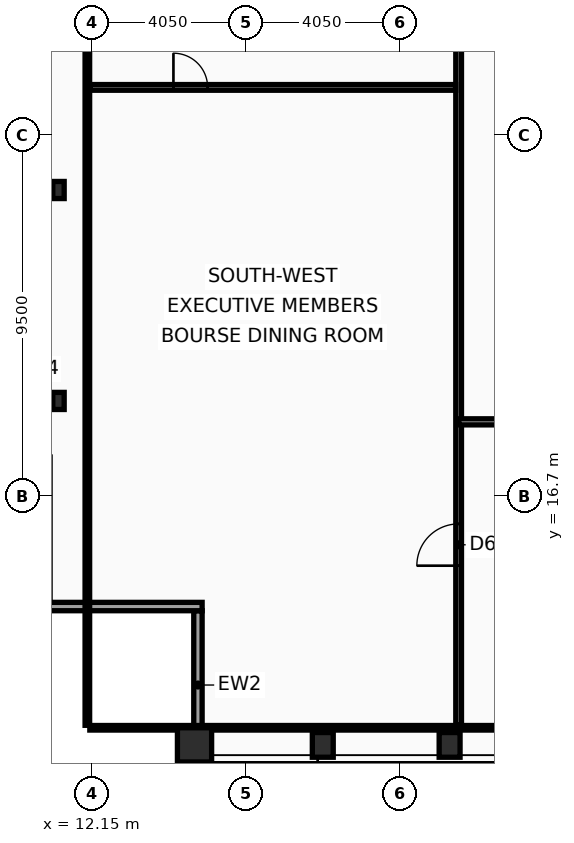
"""IFC4 building model, lengths in metres.
Left out: names, types, materials, properties, quantities, classifications, styles, units other than length and angle.
Written with IfcOpenShell. Run it as: python <this file> out.ifc"""

import sys

from ifc_helpers import new_model, si_unit, direction, frame, frame_2d, origin, origin_2d, place, context, subcontext, project, spatial, rectangle, hollow_rectangle, i_section, extrude, element, fill, save


model = new_model("IFC4")
c1 = context("Model", 3, precision=1e-05, world=origin(), true_north=direction((0.0, 1.0)))
c2 = subcontext(c1, "Body", "Model", "MODEL_VIEW")
j1 = project(units=[si_unit("LENGTHUNIT", "METRE"), si_unit("PLANEANGLEUNIT", "RADIAN")], contexts=[c1])
p1 = place(None, origin())
s1 = spatial("IfcSite", under=j1, at=p1, CompositionType="ELEMENT")
p2 = place(p1, origin())
s2 = spatial("IfcBuilding", under=s1, at=p2, CompositionType="ELEMENT")
p3 = place(p2, frame((0.0, 0.0, 295.0)))
s3 = spatial("IfcBuildingStorey", under=s2, at=p3, CompositionType="ELEMENT", Elevation=295.0)
p4 = place(p3, frame((14.85, 10.15, 0.0), z_axis=(0.0, 0.0, 1.0), x_axis=(1.0, 0.0, 0.0)))
e1 = element("IfcColumn", 1, at=p4, inside=s3, PredefinedType="COLUMN", context=c2, shape_type="SweptSolid", body=[
    extrude(hollow_rectangle(XDim=0.9, YDim=0.9, WallThickness=0.05, at=origin_2d()), origin(), (0.0, 0.0, 1.0), 3.6),
])
for number, where, z_axis, x_axis in (
    (2, (18.225, 10.15, 0.0), (0.0, 0.0, 1.0), (1.0, 0.0, 0.0)),
    (3, (21.562, 10.15, 0.0), (0.0, 0.0, 1.0), (1.0, 0.0, 0.0)),
):
    element("IfcColumn", number, at=place(p3, frame(where, z_axis=z_axis, x_axis=x_axis)), inside=s3, PredefinedType="COLUMN", context=c2, shape_type="SweptSolid", body=[
        extrude(hollow_rectangle(XDim=0.55, YDim=0.65, WallThickness=0.04, at=origin_2d()), origin(), (0.0, 0.0, 1.0), 3.6),
    ])
for number, where, z_axis, x_axis in (
    (4, (11.27, 19.2, 0.0), (0.0, 0.0, 1.0), (1.0, 0.0, 0.0)),
    (5, (11.27, 24.75, 0.0), (0.0, 0.0, 1.0), (1.0, 0.0, 0.0)),
):
    element("IfcColumn", number, at=place(p3, frame(where, z_axis=z_axis, x_axis=x_axis)), inside=s3, PredefinedType="COLUMN", context=c2, shape_type="SweptSolid", body=[
        extrude(i_section(OverallWidth=0.3, OverallDepth=0.45, WebThickness=0.014, FlangeThickness=0.026, at=origin_2d()), origin(), (0.0, 0.0, 1.0), 3.6),
    ])
p5 = place(p3, frame((14.94, 9.77, 0.0), z_axis=(0.0, 0.0, 1.0), x_axis=(0.0, 1.0, 0.0)))
e6 = element("IfcWall", 6, at=p5, inside=s3, PredefinedType="SOLIDWALL", context=c2, shape_type="SweptSolid", body=[
    extrude(rectangle(XDim=3.91, YDim=0.22, at=frame_2d((1.955, 0.0))), origin(), (0.0, 0.0, 1.0), 2.88),
])
p6 = place(p3, frame((15.05, 13.79, 0.0), z_axis=(0.0, 0.0, 1.0), x_axis=(-1.0, 0.0, 0.0)))
e7 = element("IfcWall", 7, at=p6, inside=s3, PredefinedType="SOLIDWALL", context=c2, shape_type="SweptSolid", body=[
    extrude(rectangle(XDim=4.22, YDim=0.22, at=frame_2d((2.11, 0.0))), origin(), (0.0, 0.0, 1.0), 2.88),
])
p7 = place(p3, frame((21.8, 10.665, 0.0), z_axis=(0.0, 0.0, 1.0), x_axis=(0.0, 1.0, 0.0)))
e8 = element("IfcWall", 8, at=p7, inside=s3, PredefinedType="PARTITIONING", context=c2, shape_type="SweptSolid", body=[
    extrude(rectangle(XDim=24.955, YDim=0.15, at=frame_2d((12.478, 0.0))), origin(), (0.0, 0.0, 1.0), 3.03),
])
p8 = place(p7, frame((4.2, 0.0, 0.0)))
e9 = element("IfcOpeningElement", 9, at=p8, cuts=e8, PredefinedType="OPENING", context=c2, shape_type="SweptSolid", body=[
    extrude(rectangle(XDim=1.1, YDim=2.1, at=frame_2d((0.55, 1.05))), frame((0.0, 0.085, 0.0), z_axis=(0.0, -1.0, 0.0), x_axis=(1.0, 0.0, 0.0)), (0.0, 0.0, 1.0), 0.17),
])
p9 = place(p3, frame((12.095, 27.45, 0.0), z_axis=(0.0, 0.0, 1.0), x_axis=(1.0, 0.0, 0.0)))
e10 = element("IfcWall", 10, at=p9, inside=s3, PredefinedType="PARTITIONING", context=c2, shape_type="SweptSolid", body=[
    extrude(rectangle(XDim=9.625, YDim=0.15, at=frame_2d((4.812, 0.0))), origin(), (0.0, 0.0, 1.0), 2.78),
])
p10 = place(p9, frame((2.2, 0.0, 0.0)))
e11 = element("IfcOpeningElement", 11, at=p10, cuts=e10, PredefinedType="OPENING", context=c2, shape_type="SweptSolid", body=[
    extrude(rectangle(XDim=0.9, YDim=2.05, at=frame_2d((0.45, 1.025))), frame((0.0, 0.085, 0.0), z_axis=(0.0, -1.0, 0.0), x_axis=(1.0, 0.0, 0.0)), (0.0, 0.0, 1.0), 0.17),
])
p11 = place(p3, frame((21.8, 18.65, 0.0), z_axis=(0.0, 0.0, 1.0), x_axis=(1.0, 0.0, 0.0)))
e12 = element("IfcWall", 12, at=p11, inside=s3, PredefinedType="PARTITIONING", context=c2, shape_type="SweptSolid", body=[
    extrude(rectangle(XDim=10.032, YDim=0.16, at=frame_2d((5.016, 0.0))), origin(), (0.0, 0.0, 1.0), 2.78),
])
p12 = place(p11, frame((4.213, 0.0, 0.0)))
e13 = element("IfcOpeningElement", 13, at=p12, cuts=e12, PredefinedType="OPENING", context=c2, shape_type="SweptSolid", body=[
    extrude(rectangle(XDim=1.0, YDim=2.05, at=frame_2d((0.5, 1.025))), frame((0.0, 0.09, 0.0), z_axis=(0.0, -1.0, 0.0), x_axis=(1.0, 0.0, 0.0)), (0.0, 0.0, 1.0), 0.18),
])
p13 = place(p3, frame((12.03, 10.665, 0.0), z_axis=(0.0, 0.0, 1.0), x_axis=(0.0, 1.0, 0.0)))
e14 = element("IfcWall", 14, at=p13, inside=s3, PredefinedType="PARTITIONING", context=c2, shape_type="SweptSolid", body=[
    extrude(rectangle(XDim=42.11, YDim=0.12, at=frame_2d((21.055, 0.0))), origin(), (0.0, 0.0, 1.0), 2.78),
])
p14 = place(p3, frame((12.095, 10.6, 0.0), z_axis=(0.0, 0.0, 1.0), x_axis=(1.0, 0.0, 0.0)))
e15 = element("IfcWall", 15, at=p14, inside=s3, PredefinedType="PARTITIONING", context=c2, shape_type="SweptSolid", body=[
    extrude(rectangle(XDim=48.71, YDim=0.12, at=frame_2d((24.355, 0.0))), origin(), (0.0, 0.0, 1.0), 2.78),
])
p15 = place(p8, origin())
e16 = element("IfcDoor", 16, at=p15, inside=s3, OperationType="SINGLE_SWING_LEFT", PredefinedType="DOOR", context=c2, shape_type="SweptSolid", body=[
    extrude(rectangle(XDim=1.1, YDim=2.1, at=frame_2d((0.55, 1.05))), frame((0.0, 0.025, 0.0), z_axis=(0.0, -1.0, 0.0), x_axis=(1.0, 0.0, 0.0)), (0.0, 0.0, 1.0), 0.05),
])
fill(e9, e16)
p16 = place(p10, origin())
e17 = element("IfcDoor", 17, at=p16, inside=s3, OperationType="SINGLE_SWING_LEFT", PredefinedType="DOOR", context=c2, shape_type="SweptSolid", body=[
    extrude(rectangle(XDim=0.9, YDim=2.05, at=frame_2d((0.45, 1.025))), frame((0.0, 0.025, 0.0), z_axis=(0.0, -1.0, 0.0), x_axis=(1.0, 0.0, 0.0)), (0.0, 0.0, 1.0), 0.05),
])
fill(e11, e17)
save(model, sys.argv[1])
